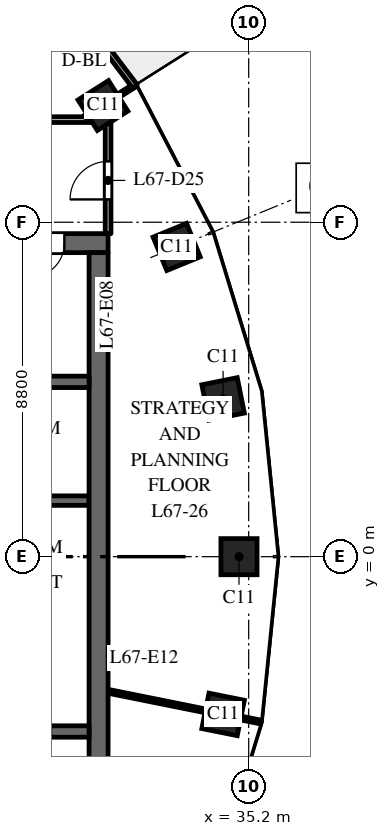
"""IFC4 building model, lengths in metres.
Left out: names, types, materials, properties, quantities, classifications, styles, units other than length and angle.
Written with IfcOpenShell. Run it as: python <this file> out.ifc"""

import sys

from ifc_helpers import new_model, si_unit, direction, frame, frame_2d, origin, origin_2d, place, context, subcontext, project, spatial, rectangle, extrude, element, fill, save


model = new_model("IFC4")
c1 = context("Model", 3, precision=1e-05, world=origin(), true_north=direction((0.0, 1.0)))
c2 = subcontext(c1, "Body", "Model", "MODEL_VIEW")
j1 = project(units=[si_unit("LENGTHUNIT", "METRE"), si_unit("PLANEANGLEUNIT", "RADIAN")], contexts=[c1])
p1 = place(None, origin())
s1 = spatial("IfcSite", under=j1, at=p1, CompositionType="ELEMENT")
p2 = place(p1, origin())
s2 = spatial("IfcBuilding", under=s1, at=p2, CompositionType="ELEMENT")
p3 = place(p2, frame((0.0, 0.0, 311.0)))
s3 = spatial("IfcBuildingStorey", under=s2, at=p3, CompositionType="ELEMENT", Elevation=311.0)
for number, where, z_axis, x_axis in (
    (1, (34.945, 0.0, 0.0), (0.0, 0.0, 1.0), (0.0, 1.0, 0.0)),
    (2, (34.527, 4.151, 0.0), (0.0, 0.0, 1.0), (-0.197, 0.98, 0.0)),
    (3, (33.305, 8.149, 0.0), (0.0, 0.0, 1.0), (-0.379, 0.925, 0.0)),
    (4, (31.365, 11.871, 0.0), (0.0, 0.0, 1.0), (-0.535, 0.845, 0.0)),
    (5, (34.527, -4.151, 0.0), (0.0, 0.0, 1.0), (0.197, 0.98, 0.0)),
):
    element("IfcColumn", number, at=place(p3, frame(where, z_axis=z_axis, x_axis=x_axis)), inside=s3, PredefinedType="COLUMN", context=c2, shape_type="SweptSolid", body=[
        extrude(rectangle(XDim=0.95, YDim=0.95, at=origin_2d()), origin(), (0.0, 0.0, 1.0), 4.0),
    ])
p4 = place(p3, frame((16.5, 8.25, 0.0), z_axis=(0.0, 0.0, 1.0), x_axis=(1.0, 0.0, 0.0)))
e6 = element("IfcWall", 6, at=p4, inside=s3, PredefinedType="SHEAR", context=c2, shape_type="SweptSolid", body=[
    extrude(rectangle(XDim=15.0, YDim=0.5, at=frame_2d((7.5, 0.0))), origin(), (0.0, 0.0, 1.0), 3.7),
])
p5 = place(p4, frame((6.9, 0.0, 0.0)))
e7 = element("IfcOpeningElement", 7, at=p5, cuts=e6, PredefinedType="OPENING", context=c2, shape_type="SweptSolid", body=[
    extrude(rectangle(XDim=1.2, YDim=2.1, at=frame_2d((0.6, 1.05))), frame((0.0, 0.26, 0.0), z_axis=(0.0, -1.0, 0.0), x_axis=(1.0, 0.0, 0.0)), (0.0, 0.0, 1.0), 0.52),
])
p6 = place(p4, frame((12.95, 0.0, 0.0)))
e8 = element("IfcOpeningElement", 8, at=p6, cuts=e6, PredefinedType="OPENING", context=c2, shape_type="SweptSolid", body=[
    extrude(rectangle(XDim=0.9, YDim=2.1, at=frame_2d((0.45, 1.05))), frame((0.0, 0.26, 0.0), z_axis=(0.0, -1.0, 0.0), x_axis=(1.0, 0.0, 0.0)), (0.0, 0.0, 1.0), 0.52),
])
p7 = place(p3, frame((27.8, 1.475, 0.0), z_axis=(0.0, 0.0, 1.0), x_axis=(1.0, 0.0, 0.0)))
e9 = element("IfcWall", 9, at=p7, inside=s3, PredefinedType="SHEAR", context=c2, shape_type="SweptSolid", body=[
    extrude(rectangle(XDim=3.2, YDim=0.25, at=frame_2d((1.6, 0.0))), origin(), (0.0, 0.0, 1.0), 3.7),
])
p8 = place(p3, frame((31.25, -8.0, 0.0), z_axis=(0.0, 0.0, 1.0), x_axis=(0.0, 1.0, 0.0)))
e10 = element("IfcWall", 10, at=p8, inside=s3, PredefinedType="SHEAR", context=c2, shape_type="SweptSolid", body=[
    extrude(rectangle(XDim=16.0, YDim=0.5, at=frame_2d((8.0, 0.0))), origin(), (0.0, 0.0, 1.0), 3.7),
])
p9 = place(p3, frame((24.9, 4.6, 0.0), z_axis=(0.0, 0.0, 1.0), x_axis=(1.0, 0.0, 0.0)))
e11 = element("IfcWall", 11, at=p9, inside=s3, PredefinedType="SHEAR", context=c2, shape_type="SweptSolid", body=[
    extrude(rectangle(XDim=6.1, YDim=0.3, at=frame_2d((3.05, 0.0))), origin(), (0.0, 0.0, 1.0), 3.7),
])
p10 = place(p3, frame((24.9, -4.6, 0.0), z_axis=(0.0, 0.0, 1.0), x_axis=(1.0, 0.0, 0.0)))
e12 = element("IfcWall", 12, at=p10, inside=s3, PredefinedType="SHEAR", context=c2, shape_type="SweptSolid", body=[
    extrude(rectangle(XDim=6.1, YDim=0.3, at=frame_2d((3.05, 0.0))), origin(), (0.0, 0.0, 1.0), 3.7),
])
p11 = place(p10, frame((4.2, 0.0, 0.0)))
e13 = element("IfcOpeningElement", 13, at=p11, cuts=e12, PredefinedType="OPENING", context=c2, shape_type="SweptSolid", body=[
    extrude(rectangle(XDim=0.9, YDim=2.1, at=frame_2d((0.45, 1.05))), frame((0.0, 0.16, 0.0), z_axis=(0.0, -1.0, 0.0), x_axis=(1.0, 0.0, 0.0)), (0.0, 0.0, 1.0), 0.32),
])
p12 = place(p3, frame((32.208, 12.374, 0.0), z_axis=(0.0, 0.0, 1.0), x_axis=(-0.604045763106, 0.796949632081, 0.0)))
e14 = element("IfcWall", 14, at=p12, inside=s3, PredefinedType="STANDARD", context=c2, shape_type="SweptSolid", body=[
    extrude(rectangle(XDim=4.423, YDim=0.15, at=frame_2d((2.212, 0.0))), origin(), (0.0, 0.0, 1.0), 3.7),
])
p13 = place(p12, frame((1.712, 0.0, 0.0)))
e15 = element("IfcOpeningElement", 15, at=p13, cuts=e14, PredefinedType="OPENING", context=c2, shape_type="SweptSolid", body=[
    extrude(rectangle(XDim=1.0, YDim=2.4, at=frame_2d((0.5, 1.2))), frame((0.0, 0.085, 0.0), z_axis=(0.0, -1.0, 0.0), x_axis=(1.0, 0.0, 0.0)), (0.0, 0.0, 1.0), 0.17),
])
p14 = place(p3, frame((7.129, 11.5, 0.0), z_axis=(0.0, 0.0, 1.0), x_axis=(1.0, 0.0, 0.0)))
e16 = element("IfcWall", 16, at=p14, inside=s3, PredefinedType="PARTITIONING", context=c2, shape_type="SweptSolid", body=[
    extrude(rectangle(XDim=24.371, YDim=0.15, at=frame_2d((12.186, 0.0))), origin(), (0.0, 0.0, 1.0), 2.75),
])
p15 = place(p14, frame((2.609, 0.0, 0.0)))
e17 = element("IfcOpeningElement", 17, at=p15, cuts=e16, PredefinedType="OPENING", context=c2, shape_type="SweptSolid", body=[
    extrude(rectangle(XDim=1.0, YDim=2.1, at=frame_2d((0.5, 1.05))), frame((0.0, 0.085, 0.0), z_axis=(0.0, -1.0, 0.0), x_axis=(1.0, 0.0, 0.0)), (0.0, 0.0, 1.0), 0.17),
])
p16 = place(p14, frame((9.1, 0.0, 0.0)))
e18 = element("IfcOpeningElement", 18, at=p16, cuts=e16, PredefinedType="OPENING", context=c2, shape_type="SweptSolid", body=[
    extrude(rectangle(XDim=1.0, YDim=2.1, at=frame_2d((0.5, 1.05))), frame((0.0, 0.085, 0.0), z_axis=(0.0, -1.0, 0.0), x_axis=(1.0, 0.0, 0.0)), (0.0, 0.0, 1.0), 0.17),
])
p17 = place(p14, frame((17.755, 0.0, 0.0)))
e19 = element("IfcOpeningElement", 19, at=p17, cuts=e16, PredefinedType="OPENING", context=c2, shape_type="SweptSolid", body=[
    extrude(rectangle(XDim=1.0, YDim=2.1, at=frame_2d((0.5, 1.05))), frame((0.0, 0.085, 0.0), z_axis=(0.0, -1.0, 0.0), x_axis=(1.0, 0.0, 0.0)), (0.0, 0.0, 1.0), 0.17),
])
p18 = place(p3, frame((30.897, 11.575, 0.0), z_axis=(0.0, 0.0, 1.0), x_axis=(0.844757626245, 0.535149094086, 0.0)))
e20 = element("IfcWall", 20, at=p18, inside=s3, PredefinedType="PARTITIONING", context=c2, shape_type="SweptSolid", body=[
    extrude(rectangle(XDim=1.557, YDim=0.1, at=frame_2d((0.778, 0.0))), origin(), (0.0, 0.0, 1.0), 3.0),
])
p19 = place(p3, frame((31.5, -3.542, 0.0), z_axis=(0.0, 0.0, 1.0), x_axis=(0.980357474535, -0.197228857227, 0.0)))
e21 = element("IfcWall", 21, at=p19, inside=s3, PredefinedType="PARTITIONING", context=c2, shape_type="SweptSolid", body=[
    extrude(rectangle(XDim=4.092, YDim=0.1, at=frame_2d((2.046, 0.0))), origin(), (0.0, 0.0, 1.0), 3.0),
])
p20 = place(p3, frame((31.5, 8.5, 0.0), z_axis=(0.0, 0.0, 1.0), x_axis=(0.0, 1.0, 0.0)))
e22 = element("IfcWall", 22, at=p20, inside=s3, PredefinedType="PARTITIONING", context=c2, shape_type="SweptSolid", body=[
    extrude(rectangle(XDim=3.0, YDim=0.15, at=frame_2d((1.5, 0.0))), origin(), (0.0, 0.0, 1.0), 3.0),
])
p21 = place(p20, frame((0.9, 0.0, 0.0)))
e23 = element("IfcOpeningElement", 23, at=p21, cuts=e22, PredefinedType="OPENING", context=c2, shape_type="SweptSolid", body=[
    extrude(rectangle(XDim=1.0, YDim=2.1, at=frame_2d((0.5, 1.05))), frame((0.0, 0.085, 0.0), z_axis=(0.0, -1.0, 0.0), x_axis=(1.0, 0.0, 0.0)), (0.0, 0.0, 1.0), 0.17),
])
p22 = place(p6, origin())
e24 = element("IfcDoor", 24, at=p22, inside=s3, OperationType="SINGLE_SWING_LEFT", PredefinedType="DOOR", context=c2, shape_type="SweptSolid", body=[
    extrude(rectangle(XDim=0.9, YDim=2.1, at=frame_2d((0.45, 1.05))), frame((0.0, 0.025, 0.0), z_axis=(0.0, -1.0, 0.0), x_axis=(1.0, 0.0, 0.0)), (0.0, 0.0, 1.0), 0.05),
])
fill(e8, e24)
p23 = place(p21, origin())
e25 = element("IfcDoor", 25, at=p23, inside=s3, OperationType="SINGLE_SWING_LEFT", PredefinedType="DOOR", context=c2, shape_type="SweptSolid", body=[
    extrude(rectangle(XDim=1.0, YDim=2.1, at=frame_2d((0.5, 1.05))), frame((0.0, 0.025, 0.0), z_axis=(0.0, -1.0, 0.0), x_axis=(1.0, 0.0, 0.0)), (0.0, 0.0, 1.0), 0.05),
])
fill(e23, e25)
save(model, sys.argv[1])
